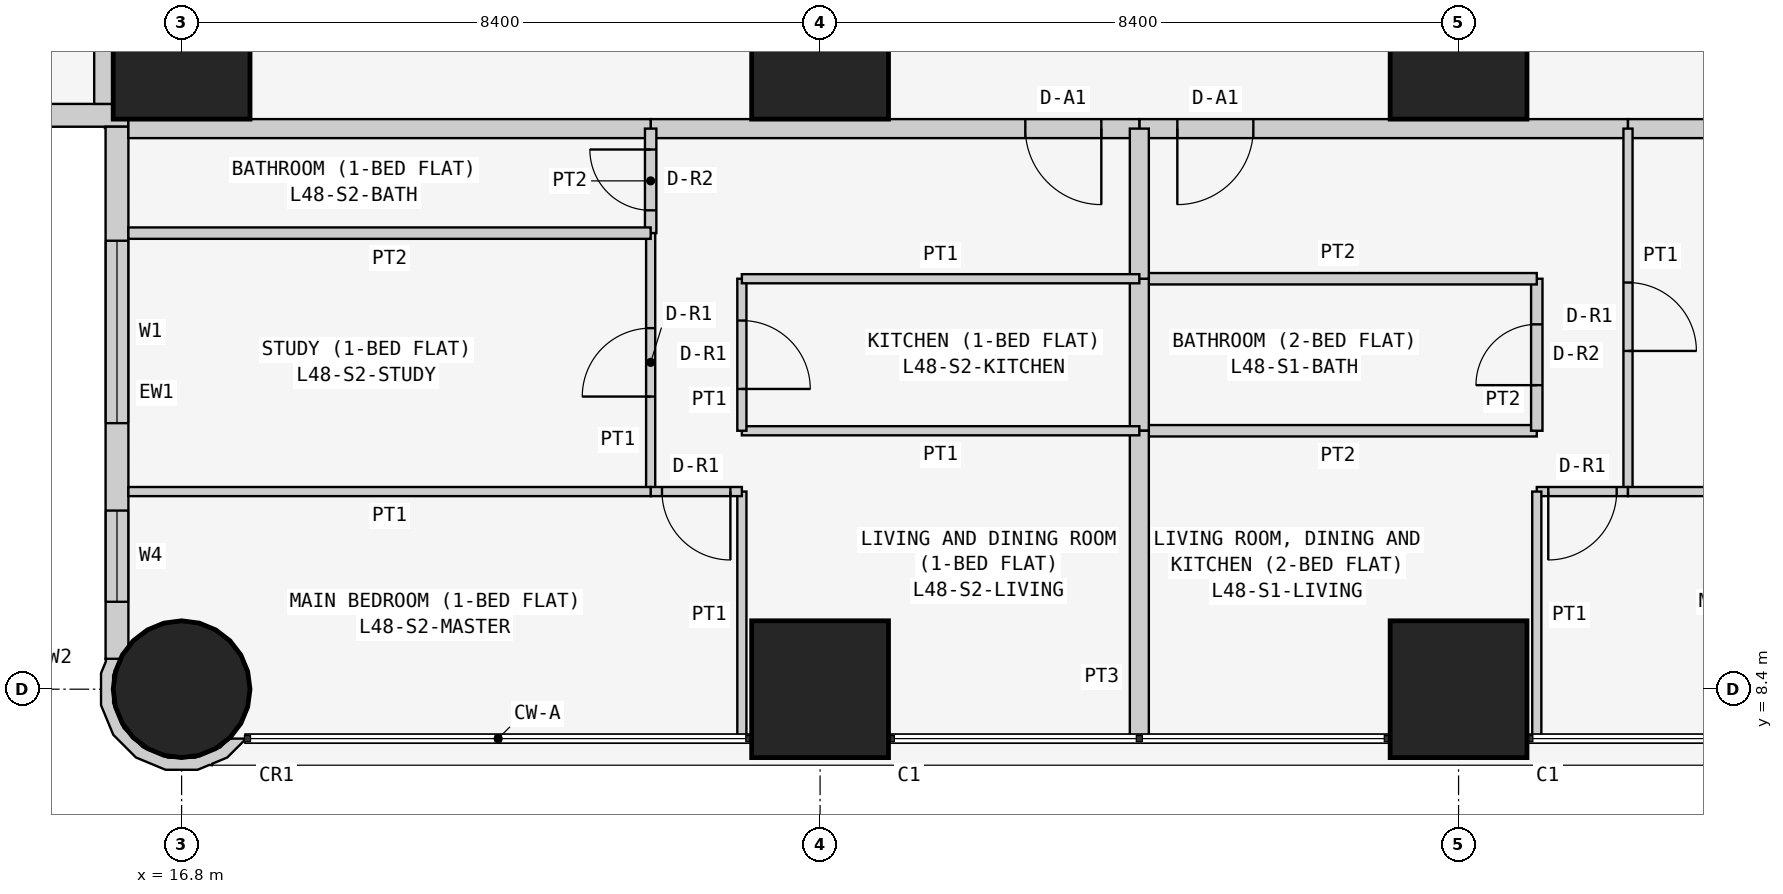
"""IFC4 building model, lengths in metres.
Left out: names, types, materials, properties, quantities, classifications, styles, units other than length and angle.
Written with IfcOpenShell. Run it as: python <this file> out.ifc"""

import sys

from ifc_helpers import new_model, si_unit, direction, frame, frame_2d, origin, origin_2d, place, context, subcontext, project, spatial, polyline, rectangle, circle, outline, extrude, element, fill, save


model = new_model("IFC4")
c1 = context("Model", 3, precision=1e-05, world=origin(), true_north=direction((0.0, 1.0)))
c2 = subcontext(c1, "Body", "Model", "MODEL_VIEW")
j1 = project(units=[si_unit("LENGTHUNIT", "METRE"), si_unit("PLANEANGLEUNIT", "RADIAN")], contexts=[c1])
p1 = place(None, origin())
s1 = spatial("IfcSite", under=j1, at=p1, CompositionType="ELEMENT")
p2 = place(p1, origin())
s2 = spatial("IfcBuilding", under=s1, at=p2, CompositionType="ELEMENT")
p3 = place(p2, frame((0.0, 0.0, 186.9)))
s3 = spatial("IfcBuildingStorey", under=s2, at=p3, CompositionType="ELEMENT", Elevation=186.9)
p4 = place(p3, frame((16.8, 8.4, 0.0), z_axis=(0.0, 0.0, 1.0), x_axis=(1.0, 0.0, 0.0)))
e1 = element("IfcColumn", 1, at=p4, inside=s3, PredefinedType="COLUMN", context=c2, shape_type="SweptSolid", body=[
    extrude(circle(Radius=0.9, at=origin_2d()), origin(), (0.0, 0.0, 1.0), 3.6),
])
for number, where, z_axis, x_axis in (
    (2, (16.8, 16.8, 0.0), (0.0, 0.0, 1.0), (1.0, 0.0, 0.0)),
    (3, (25.2, 8.4, 0.0), (0.0, 0.0, 1.0), (1.0, 0.0, 0.0)),
    (4, (25.2, 16.8, 0.0), (0.0, 0.0, 1.0), (1.0, 0.0, 0.0)),
    (5, (33.6, 8.4, 0.0), (0.0, 0.0, 1.0), (1.0, 0.0, 0.0)),
    (6, (33.6, 16.8, 0.0), (0.0, 0.0, 1.0), (1.0, 0.0, 0.0)),
):
    element("IfcColumn", number, at=place(p3, frame(where, z_axis=z_axis, x_axis=x_axis)), inside=s3, PredefinedType="COLUMN", context=c2, shape_type="SweptSolid", body=[
        extrude(rectangle(XDim=1.8, YDim=1.8, at=origin_2d()), origin(), (0.0, 0.0, 1.0), 3.6),
    ])
p5 = place(p3, frame((0.4, 15.95, 0.0), z_axis=(0.0, 0.0, 1.0), x_axis=(1.0, 0.0, 0.0)))
e7 = element("IfcWall", 7, at=p5, inside=s3, PredefinedType="SOLIDWALL", context=c2, shape_type="SweptSolid", body=[
    extrude(rectangle(XDim=15.7, YDim=0.3, at=frame_2d((7.85, 0.0))), origin(), (0.0, 0.0, 1.0), 3.45),
])
p6 = place(p5, frame((12.4, 0.0, 0.9)))
e8 = element("IfcOpeningElement", 8, at=p6, cuts=e7, PredefinedType="OPENING", context=c2, shape_type="SweptSolid", body=[
    extrude(rectangle(XDim=1.8, YDim=1.5, at=frame_2d((0.9, 0.75))), frame((0.0, 0.16, 0.0), z_axis=(0.0, -1.0, 0.0), x_axis=(1.0, 0.0, 0.0)), (0.0, 0.0, 1.0), 0.32),
])
p7 = place(p5, frame((9.55, 0.0, 1.5)))
e9 = element("IfcOpeningElement", 9, at=p7, cuts=e7, PredefinedType="OPENING", context=c2, shape_type="SweptSolid", body=[
    extrude(rectangle(XDim=0.9, YDim=0.7, at=frame_2d((0.45, 0.35))), frame((0.0, 0.16, 0.0), z_axis=(0.0, -1.0, 0.0), x_axis=(1.0, 0.0, 0.0)), (0.0, 0.0, 1.0), 0.32),
])
p8 = place(p5, frame((5.1, 0.0, 0.9)))
e10 = element("IfcOpeningElement", 10, at=p8, cuts=e7, PredefinedType="OPENING", context=c2, shape_type="SweptSolid", body=[
    extrude(rectangle(XDim=1.8, YDim=1.5, at=frame_2d((0.9, 0.75))), frame((0.0, 0.16, 0.0), z_axis=(0.0, -1.0, 0.0), x_axis=(1.0, 0.0, 0.0)), (0.0, 0.0, 1.0), 0.32),
])
p9 = place(p5, frame((2.0, 0.0, 0.0)))
e11 = element("IfcOpeningElement", 11, at=p9, cuts=e7, PredefinedType="OPENING", context=c2, shape_type="SweptSolid", body=[
    extrude(rectangle(XDim=0.9, YDim=2.4, at=frame_2d((0.45, 1.2))), frame((0.0, 0.16, 0.0), z_axis=(0.0, -1.0, 0.0), x_axis=(1.0, 0.0, 0.0)), (0.0, 0.0, 1.0), 0.32),
])
p10 = place(p5, frame((0.7, 0.0, 0.9)))
e12 = element("IfcOpeningElement", 12, at=p10, cuts=e7, PredefinedType="OPENING", context=c2, shape_type="SweptSolid", body=[
    extrude(rectangle(XDim=1.2, YDim=1.5, at=frame_2d((0.6, 0.75))), frame((0.0, 0.16, 0.0), z_axis=(0.0, -1.0, 0.0), x_axis=(1.0, 0.0, 0.0)), (0.0, 0.0, 1.0), 0.32),
])
p11 = place(p3, frame((15.95, 15.8, 0.0), z_axis=(0.0, 0.0, 1.0), x_axis=(0.0, -1.0, 0.0)))
e13 = element("IfcWall", 13, at=p11, inside=s3, PredefinedType="SOLIDWALL", context=c2, shape_type="SweptSolid", body=[
    extrude(rectangle(XDim=7.0, YDim=0.3, at=frame_2d((3.5, 0.0))), origin(), (0.0, 0.0, 1.0), 3.45),
])
p12 = place(p11, frame((1.5, 0.0, 0.9)))
e14 = element("IfcOpeningElement", 14, at=p12, cuts=e13, PredefinedType="OPENING", context=c2, shape_type="SweptSolid", body=[
    extrude(rectangle(XDim=2.4, YDim=1.5, at=frame_2d((1.2, 0.75))), frame((0.0, 0.16, 0.0), z_axis=(0.0, -1.0, 0.0), x_axis=(1.0, 0.0, 0.0)), (0.0, 0.0, 1.0), 0.32),
])
p13 = place(p11, frame((5.05, 0.0, 0.9)))
e15 = element("IfcOpeningElement", 15, at=p13, cuts=e13, PredefinedType="OPENING", context=c2, shape_type="SweptSolid", body=[
    extrude(rectangle(XDim=1.2, YDim=1.5, at=frame_2d((0.6, 0.75))), frame((0.0, 0.16, 0.0), z_axis=(0.0, -1.0, 0.0), x_axis=(1.0, 0.0, 0.0)), (0.0, 0.0, 1.0), 0.32),
])
p14 = place(p3, frame((15.89, 8.764, 0.0), z_axis=(0.0, 0.0, 1.0), x_axis=(-0.377204953059, -0.926129809145, 0.0)))
e16 = element("IfcWall", 16, at=p14, inside=s3, PredefinedType="SOLIDWALL", context=c2, shape_type="SweptSolid", body=[
    extrude(outline(polyline([(0.36, 1.803), (0.509, 1.741), (0.761, 1.486), (0.896, 1.154), (0.894, 0.795), (0.755, 0.465), (0.5, 0.213), (0.168, 0.078), (-0.1, 0.08), (0.001, -0.097), (0.03, -0.08), (0.198, -0.081), (0.589, 0.078), (0.889, 0.374), (1.052, 0.763), (1.055, 1.184), (0.896, 1.575), (0.778, 1.695), (0.769, 1.728), (0.75, 1.723), (0.6, 1.875), (0.295, 2.004), (0.281, 1.998), (0.36, 1.803)])), origin(), (0.0, 0.0, 1.0), 3.45),
])
p15 = place(p3, frame((35.829, 15.775, 0.0), z_axis=(0.0, 0.0, 1.0), x_axis=(-1.0, 0.0, 0.0)))
e17 = element("IfcWall", 17, at=p15, inside=s3, PredefinedType="PARTITIONING", context=c2, shape_type="SweptSolid", body=[
    extrude(rectangle(XDim=6.429, YDim=0.25, at=frame_2d((3.215, 0.0))), origin(), (0.0, 0.0, 1.0), 3.45),
])
p16 = place(p15, frame((4.929, 0.0, 0.0)))
e18 = element("IfcOpeningElement", 18, at=p16, cuts=e17, PredefinedType="OPENING", context=c2, shape_type="SweptSolid", body=[
    extrude(rectangle(XDim=1.0, YDim=2.1, at=frame_2d((0.5, 1.05))), frame((0.0, 0.135, 0.0), z_axis=(0.0, -1.0, 0.0), x_axis=(1.0, 0.0, 0.0)), (0.0, 0.0, 1.0), 0.27),
])
p17 = place(p3, frame((42.7, 15.775, 0.0), z_axis=(0.0, 0.0, 1.0), x_axis=(-1.0, 0.0, 0.0)))
e19 = element("IfcWall", 19, at=p17, inside=s3, PredefinedType="PARTITIONING", context=c2, shape_type="SweptSolid", body=[
    extrude(rectangle(XDim=6.871, YDim=0.25, at=frame_2d((3.436, 0.0))), origin(), (0.0, 0.0, 1.0), 3.45),
])
p18 = place(p3, frame((29.4, 15.775, 0.0), z_axis=(0.0, 0.0, 1.0), x_axis=(-1.0, 0.0, 0.0)))
e20 = element("IfcWall", 20, at=p18, inside=s3, PredefinedType="PARTITIONING", context=c2, shape_type="SweptSolid", body=[
    extrude(rectangle(XDim=6.429, YDim=0.25, at=frame_2d((3.214, 0.0))), origin(), (0.0, 0.0, 1.0), 3.45),
])
p19 = place(p18, frame((0.5, 0.0, 0.0)))
e21 = element("IfcOpeningElement", 21, at=p19, cuts=e20, PredefinedType="OPENING", context=c2, shape_type="SweptSolid", body=[
    extrude(rectangle(XDim=1.0, YDim=2.1, at=frame_2d((0.5, 1.05))), frame((0.0, 0.135, 0.0), z_axis=(0.0, -1.0, 0.0), x_axis=(1.0, 0.0, 0.0)), (0.0, 0.0, 1.0), 0.27),
])
for number, where, z_axis, x_axis in (
    (22, (22.971, 15.775, 0.0), (0.0, 0.0, 1.0), (-1.0, 0.0, 0.0)),
    (23, (15.775, 16.1, 0.0), (0.0, 0.0, 1.0), (0.0, 1.0, 0.0)),
):
    element("IfcWall", number, at=place(p3, frame(where, z_axis=z_axis, x_axis=x_axis)), inside=s3, PredefinedType="PARTITIONING", context=c2, shape_type="SweptSolid", body=[
        extrude(rectangle(XDim=6.871, YDim=0.25, at=frame_2d((3.436, 0.0))), origin(), (0.0, 0.0, 1.0), 3.45),
    ])
p20 = place(p3, frame((29.4, 11.8, 0.0), z_axis=(0.0, 0.0, 1.0), x_axis=(1.0, 0.0, 0.0)))
e24 = element("IfcWall", 24, at=p20, inside=s3, PredefinedType="PARTITIONING", context=c2, shape_type="SweptSolid", body=[
    extrude(rectangle(XDim=5.229, YDim=0.15, at=frame_2d((2.615, 0.0))), origin(), (0.0, 0.0, 1.0), 3.45),
])
p21 = place(p3, frame((34.629, 11.8, 0.0), z_axis=(0.0, 0.0, 1.0), x_axis=(0.0, 1.0, 0.0)))
e25 = element("IfcWall", 25, at=p21, inside=s3, PredefinedType="PARTITIONING", context=c2, shape_type="SweptSolid", body=[
    extrude(rectangle(XDim=2.0, YDim=0.15, at=frame_2d((1.0, 0.0))), origin(), (0.0, 0.0, 1.0), 3.45),
])
p22 = place(p21, frame((0.6, 0.0, 0.0)))
e26 = element("IfcOpeningElement", 26, at=p22, cuts=e25, PredefinedType="OPENING", context=c2, shape_type="SweptSolid", body=[
    extrude(rectangle(XDim=0.8, YDim=2.1, at=frame_2d((0.4, 1.05))), frame((0.0, 0.085, 0.0), z_axis=(0.0, -1.0, 0.0), x_axis=(1.0, 0.0, 0.0)), (0.0, 0.0, 1.0), 0.17),
])
p23 = place(p3, frame((34.629, 13.8, 0.0), z_axis=(0.0, 0.0, 1.0), x_axis=(-1.0, 0.0, 0.0)))
e27 = element("IfcWall", 27, at=p23, inside=s3, PredefinedType="PARTITIONING", context=c2, shape_type="SweptSolid", body=[
    extrude(rectangle(XDim=5.229, YDim=0.15, at=frame_2d((2.615, 0.0))), origin(), (0.0, 0.0, 1.0), 3.45),
])
p24 = place(p3, frame((29.4, 13.8, 0.0), z_axis=(0.0, 0.0, 1.0), x_axis=(0.0, -1.0, 0.0)))
e28 = element("IfcWall", 28, at=p24, inside=s3, PredefinedType="PARTITIONING", context=c2, shape_type="SweptSolid", body=[
    extrude(rectangle(XDim=2.0, YDim=0.25, at=frame_2d((1.0, 0.0))), origin(), (0.0, 0.0, 1.0), 2.848),
])
p25 = place(p3, frame((35.829, 15.775, 0.0), z_axis=(0.0, 0.0, 1.0), x_axis=(0.0, -1.0, 0.0)))
e29 = element("IfcWall", 29, at=p25, inside=s3, PredefinedType="PARTITIONING", context=c2, shape_type="SweptSolid", body=[
    extrude(rectangle(XDim=4.775, YDim=0.12, at=frame_2d((2.387, 0.0))), origin(), (0.0, 0.0, 1.0), 3.45),
])
p26 = place(p25, frame((2.025, 0.0, 0.0)))
e30 = element("IfcOpeningElement", 30, at=p26, cuts=e29, PredefinedType="OPENING", context=c2, shape_type="SweptSolid", body=[
    extrude(rectangle(XDim=0.9, YDim=2.1, at=frame_2d((0.45, 1.05))), frame((0.0, 0.07, 0.0), z_axis=(0.0, -1.0, 0.0), x_axis=(1.0, 0.0, 0.0)), (0.0, 0.0, 1.0), 0.14),
])
p27 = place(p3, frame((35.829, 11.0, 0.0), z_axis=(0.0, 0.0, 1.0), x_axis=(-1.0, 0.0, 0.0)))
e31 = element("IfcWall", 31, at=p27, inside=s3, PredefinedType="PARTITIONING", context=c2, shape_type="SweptSolid", body=[
    extrude(rectangle(XDim=1.2, YDim=0.12, at=frame_2d((0.6, 0.0))), origin(), (0.0, 0.0, 1.0), 3.45),
])
p28 = place(p27, frame((0.149, 0.0, 0.0)))
e32 = element("IfcOpeningElement", 32, at=p28, cuts=e31, PredefinedType="OPENING", context=c2, shape_type="SweptSolid", body=[
    extrude(rectangle(XDim=0.9, YDim=2.1, at=frame_2d((0.45, 1.05))), frame((0.0, 0.07, 0.0), z_axis=(0.0, -1.0, 0.0), x_axis=(1.0, 0.0, 0.0)), (0.0, 0.0, 1.0), 0.14),
])
p29 = place(p3, frame((34.629, 11.0, 0.0), z_axis=(0.0, 0.0, 1.0), x_axis=(0.0, -1.0, 0.0)))
e33 = element("IfcWall", 33, at=p29, inside=s3, PredefinedType="PARTITIONING", context=c2, shape_type="SweptSolid", body=[
    extrude(rectangle(XDim=3.25, YDim=0.12, at=frame_2d((1.625, 0.0))), origin(), (0.0, 0.0, 1.0), 3.45),
])
p30 = place(p3, frame((29.4, 7.75, 0.0), z_axis=(0.0, 0.0, 1.0), x_axis=(0.0, 1.0, 0.0)))
e34 = element("IfcWall", 34, at=p30, inside=s3, PredefinedType="PARTITIONING", context=c2, shape_type="SweptSolid", body=[
    extrude(rectangle(XDim=4.05, YDim=0.25, at=frame_2d((2.025, 0.0))), origin(), (0.0, 0.0, 1.0), 2.848),
])
p31 = place(p3, frame((29.4, 13.8, 0.0), z_axis=(0.0, 0.0, 1.0), x_axis=(0.0, 1.0, 0.0)))
e35 = element("IfcWall", 35, at=p31, inside=s3, PredefinedType="PARTITIONING", context=c2, shape_type="SweptSolid", body=[
    extrude(rectangle(XDim=1.975, YDim=0.25, at=frame_2d((0.987, 0.0))), origin(), (0.0, 0.0, 1.0), 2.848),
])
p32 = place(p3, frame((35.829, 11.0, 0.0), z_axis=(0.0, 0.0, 1.0), x_axis=(1.0, 0.0, 0.0)))
e36 = element("IfcWall", 36, at=p32, inside=s3, PredefinedType="PARTITIONING", context=c2, shape_type="SweptSolid", body=[
    extrude(rectangle(XDim=6.871, YDim=0.12, at=frame_2d((3.436, 0.0))), origin(), (0.0, 0.0, 1.0), 3.45),
])
p33 = place(p3, frame((29.4, 11.8, 0.0), z_axis=(0.0, 0.0, 1.0), x_axis=(-1.0, 0.0, 0.0)))
e37 = element("IfcWall", 37, at=p33, inside=s3, PredefinedType="PARTITIONING", context=c2, shape_type="SweptSolid", body=[
    extrude(rectangle(XDim=5.229, YDim=0.12, at=frame_2d((2.615, 0.0))), origin(), (0.0, 0.0, 1.0), 3.45),
])
p34 = place(p3, frame((24.171, 11.8, 0.0), z_axis=(0.0, 0.0, 1.0), x_axis=(0.0, 1.0, 0.0)))
e38 = element("IfcWall", 38, at=p34, inside=s3, PredefinedType="PARTITIONING", context=c2, shape_type="SweptSolid", body=[
    extrude(rectangle(XDim=2.0, YDim=0.12, at=frame_2d((1.0, 0.0))), origin(), (0.0, 0.0, 1.0), 3.45),
])
p35 = place(p34, frame((0.55, 0.0, 0.0)))
e39 = element("IfcOpeningElement", 39, at=p35, cuts=e38, PredefinedType="OPENING", context=c2, shape_type="SweptSolid", body=[
    extrude(rectangle(XDim=0.9, YDim=2.1, at=frame_2d((0.45, 1.05))), frame((0.0, 0.07, 0.0), z_axis=(0.0, -1.0, 0.0), x_axis=(1.0, 0.0, 0.0)), (0.0, 0.0, 1.0), 0.14),
])
p36 = place(p3, frame((24.171, 13.8, 0.0), z_axis=(0.0, 0.0, 1.0), x_axis=(1.0, 0.0, 0.0)))
e40 = element("IfcWall", 40, at=p36, inside=s3, PredefinedType="PARTITIONING", context=c2, shape_type="SweptSolid", body=[
    extrude(rectangle(XDim=5.229, YDim=0.12, at=frame_2d((2.615, 0.0))), origin(), (0.0, 0.0, 1.0), 3.45),
])
p37 = place(p3, frame((22.971, 14.4, 0.0), z_axis=(0.0, 0.0, 1.0), x_axis=(0.0, 1.0, 0.0)))
e41 = element("IfcWall", 41, at=p37, inside=s3, PredefinedType="PARTITIONING", context=c2, shape_type="SweptSolid", body=[
    extrude(rectangle(XDim=1.375, YDim=0.15, at=frame_2d((0.688, 0.0))), origin(), (0.0, 0.0, 1.0), 3.45),
])
p38 = place(p37, frame((0.3, 0.0, 0.0)))
e42 = element("IfcOpeningElement", 42, at=p38, cuts=e41, PredefinedType="OPENING", context=c2, shape_type="SweptSolid", body=[
    extrude(rectangle(XDim=0.8, YDim=2.1, at=frame_2d((0.4, 1.05))), frame((0.0, 0.085, 0.0), z_axis=(0.0, -1.0, 0.0), x_axis=(1.0, 0.0, 0.0)), (0.0, 0.0, 1.0), 0.17),
])
p39 = place(p3, frame((22.971, 11.0, 0.0), z_axis=(0.0, 0.0, 1.0), x_axis=(0.0, 1.0, 0.0)))
e43 = element("IfcWall", 43, at=p39, inside=s3, PredefinedType="PARTITIONING", context=c2, shape_type="SweptSolid", body=[
    extrude(rectangle(XDim=3.4, YDim=0.12, at=frame_2d((1.7, 0.0))), origin(), (0.0, 0.0, 1.0), 3.45),
])
p40 = place(p39, frame((1.25, 0.0, 0.0)))
e44 = element("IfcOpeningElement", 44, at=p40, cuts=e43, PredefinedType="OPENING", context=c2, shape_type="SweptSolid", body=[
    extrude(rectangle(XDim=0.9, YDim=2.1, at=frame_2d((0.45, 1.05))), frame((0.0, 0.07, 0.0), z_axis=(0.0, -1.0, 0.0), x_axis=(1.0, 0.0, 0.0)), (0.0, 0.0, 1.0), 0.14),
])
p41 = place(p3, frame((24.171, 7.75, 0.0), z_axis=(0.0, 0.0, 1.0), x_axis=(0.0, 1.0, 0.0)))
e45 = element("IfcWall", 45, at=p41, inside=s3, PredefinedType="PARTITIONING", context=c2, shape_type="SweptSolid", body=[
    extrude(rectangle(XDim=3.25, YDim=0.12, at=frame_2d((1.625, 0.0))), origin(), (0.0, 0.0, 1.0), 3.45),
])
p42 = place(p3, frame((24.171, 11.0, 0.0), z_axis=(0.0, 0.0, 1.0), x_axis=(-1.0, 0.0, 0.0)))
e46 = element("IfcWall", 46, at=p42, inside=s3, PredefinedType="PARTITIONING", context=c2, shape_type="SweptSolid", body=[
    extrude(rectangle(XDim=1.2, YDim=0.12, at=frame_2d((0.6, 0.0))), origin(), (0.0, 0.0, 1.0), 3.45),
])
p43 = place(p42, frame((0.151, 0.0, 0.0)))
e47 = element("IfcOpeningElement", 47, at=p43, cuts=e46, PredefinedType="OPENING", context=c2, shape_type="SweptSolid", body=[
    extrude(rectangle(XDim=0.9, YDim=2.1, at=frame_2d((0.45, 1.05))), frame((0.0, 0.07, 0.0), z_axis=(0.0, -1.0, 0.0), x_axis=(1.0, 0.0, 0.0)), (0.0, 0.0, 1.0), 0.14),
])
p44 = place(p3, frame((22.971, 14.4, 0.0), z_axis=(0.0, 0.0, 1.0), x_axis=(-1.0, 0.0, 0.0)))
e48 = element("IfcWall", 48, at=p44, inside=s3, PredefinedType="PARTITIONING", context=c2, shape_type="SweptSolid", body=[
    extrude(rectangle(XDim=6.871, YDim=0.15, at=frame_2d((3.436, 0.0))), origin(), (0.0, 0.0, 1.0), 3.45),
])
p45 = place(p3, frame((22.971, 11.0, 0.0), z_axis=(0.0, 0.0, 1.0), x_axis=(-1.0, 0.0, 0.0)))
e49 = element("IfcWall", 49, at=p45, inside=s3, PredefinedType="PARTITIONING", context=c2, shape_type="SweptSolid", body=[
    extrude(rectangle(XDim=6.871, YDim=0.12, at=frame_2d((3.436, 0.0))), origin(), (0.0, 0.0, 1.0), 3.45),
])
p46 = place(p12, origin())
e50 = element("IfcWindow", 50, at=p46, inside=s3, PartitioningType="SINGLE_PANEL", PredefinedType="WINDOW", context=c2, shape_type="SweptSolid", body=[
    extrude(rectangle(XDim=2.4, YDim=1.5, at=frame_2d((1.2, 0.75))), frame((0.0, 0.03, 0.0), z_axis=(0.0, -1.0, 0.0), x_axis=(1.0, 0.0, 0.0)), (0.0, 0.0, 1.0), 0.06),
])
fill(e14, e50)
p47 = place(p13, origin())
e51 = element("IfcWindow", 51, at=p47, inside=s3, PartitioningType="SINGLE_PANEL", PredefinedType="WINDOW", context=c2, shape_type="SweptSolid", body=[
    extrude(rectangle(XDim=1.2, YDim=1.5, at=frame_2d((0.6, 0.75))), frame((0.0, 0.03, 0.0), z_axis=(0.0, -1.0, 0.0), x_axis=(1.0, 0.0, 0.0)), (0.0, 0.0, 1.0), 0.06),
])
fill(e15, e51)
p48 = place(p16, origin())
e52 = element("IfcDoor", 52, at=p48, inside=s3, OperationType="SINGLE_SWING_RIGHT", PredefinedType="DOOR", context=c2, shape_type="SweptSolid", body=[
    extrude(rectangle(XDim=1.0, YDim=2.1, at=frame_2d((0.5, 1.05))), frame((0.0, 0.025, 0.0), z_axis=(0.0, -1.0, 0.0), x_axis=(1.0, 0.0, 0.0)), (0.0, 0.0, 1.0), 0.05),
])
fill(e18, e52)
p49 = place(p22, origin())
e53 = element("IfcDoor", 53, at=p49, inside=s3, OperationType="SINGLE_SWING_LEFT", PredefinedType="DOOR", context=c2, shape_type="SweptSolid", body=[
    extrude(rectangle(XDim=0.8, YDim=2.1, at=frame_2d((0.4, 1.05))), frame((0.0, 0.025, 0.0), z_axis=(0.0, -1.0, 0.0), x_axis=(1.0, 0.0, 0.0)), (0.0, 0.0, 1.0), 0.05),
])
fill(e26, e53)
p50 = place(p26, origin())
e54 = element("IfcDoor", 54, at=p50, inside=s3, OperationType="SINGLE_SWING_RIGHT", PredefinedType="DOOR", context=c2, shape_type="SweptSolid", body=[
    extrude(rectangle(XDim=0.9, YDim=2.1, at=frame_2d((0.45, 1.05))), frame((0.0, 0.025, 0.0), z_axis=(0.0, -1.0, 0.0), x_axis=(1.0, 0.0, 0.0)), (0.0, 0.0, 1.0), 0.05),
])
fill(e30, e54)
p51 = place(p28, origin())
e55 = element("IfcDoor", 55, at=p51, inside=s3, OperationType="SINGLE_SWING_RIGHT", PredefinedType="DOOR", context=c2, shape_type="SweptSolid", body=[
    extrude(rectangle(XDim=0.9, YDim=2.1, at=frame_2d((0.45, 1.05))), frame((0.0, 0.025, 0.0), z_axis=(0.0, -1.0, 0.0), x_axis=(1.0, 0.0, 0.0)), (0.0, 0.0, 1.0), 0.05),
])
fill(e32, e55)
p52 = place(p19, origin())
e56 = element("IfcDoor", 56, at=p52, inside=s3, OperationType="SINGLE_SWING_LEFT", PredefinedType="DOOR", context=c2, shape_type="SweptSolid", body=[
    extrude(rectangle(XDim=1.0, YDim=2.1, at=frame_2d((0.5, 1.05))), frame((0.0, 0.025, 0.0), z_axis=(0.0, -1.0, 0.0), x_axis=(1.0, 0.0, 0.0)), (0.0, 0.0, 1.0), 0.05),
])
fill(e21, e56)
p53 = place(p35, frame((0.9, 0.0, 0.0), z_axis=(0.0, 0.0, 1.0), x_axis=(-1.0, 0.0, 0.0)))
e57 = element("IfcDoor", 57, at=p53, inside=s3, OperationType="SINGLE_SWING_RIGHT", PredefinedType="DOOR", context=c2, shape_type="SweptSolid", body=[
    extrude(rectangle(XDim=0.9, YDim=2.1, at=frame_2d((0.45, 1.05))), frame((0.0, 0.025, 0.0), z_axis=(0.0, -1.0, 0.0), x_axis=(1.0, 0.0, 0.0)), (0.0, 0.0, 1.0), 0.05),
])
fill(e39, e57)
p54 = place(p38, origin())
e58 = element("IfcDoor", 58, at=p54, inside=s3, OperationType="SINGLE_SWING_RIGHT", PredefinedType="DOOR", context=c2, shape_type="SweptSolid", body=[
    extrude(rectangle(XDim=0.8, YDim=2.1, at=frame_2d((0.4, 1.05))), frame((0.0, 0.025, 0.0), z_axis=(0.0, -1.0, 0.0), x_axis=(1.0, 0.0, 0.0)), (0.0, 0.0, 1.0), 0.05),
])
fill(e42, e58)
p55 = place(p40, origin())
e59 = element("IfcDoor", 59, at=p55, inside=s3, OperationType="SINGLE_SWING_LEFT", PredefinedType="DOOR", context=c2, shape_type="SweptSolid", body=[
    extrude(rectangle(XDim=0.9, YDim=2.1, at=frame_2d((0.45, 1.05))), frame((0.0, 0.025, 0.0), z_axis=(0.0, -1.0, 0.0), x_axis=(1.0, 0.0, 0.0)), (0.0, 0.0, 1.0), 0.05),
])
fill(e44, e59)
p56 = place(p43, origin())
e60 = element("IfcDoor", 60, at=p56, inside=s3, OperationType="SINGLE_SWING_LEFT", PredefinedType="DOOR", context=c2, shape_type="SweptSolid", body=[
    extrude(rectangle(XDim=0.9, YDim=2.1, at=frame_2d((0.45, 1.05))), frame((0.0, 0.025, 0.0), z_axis=(0.0, -1.0, 0.0), x_axis=(1.0, 0.0, 0.0)), (0.0, 0.0, 1.0), 0.05),
])
fill(e47, e60)
save(model, sys.argv[1])
